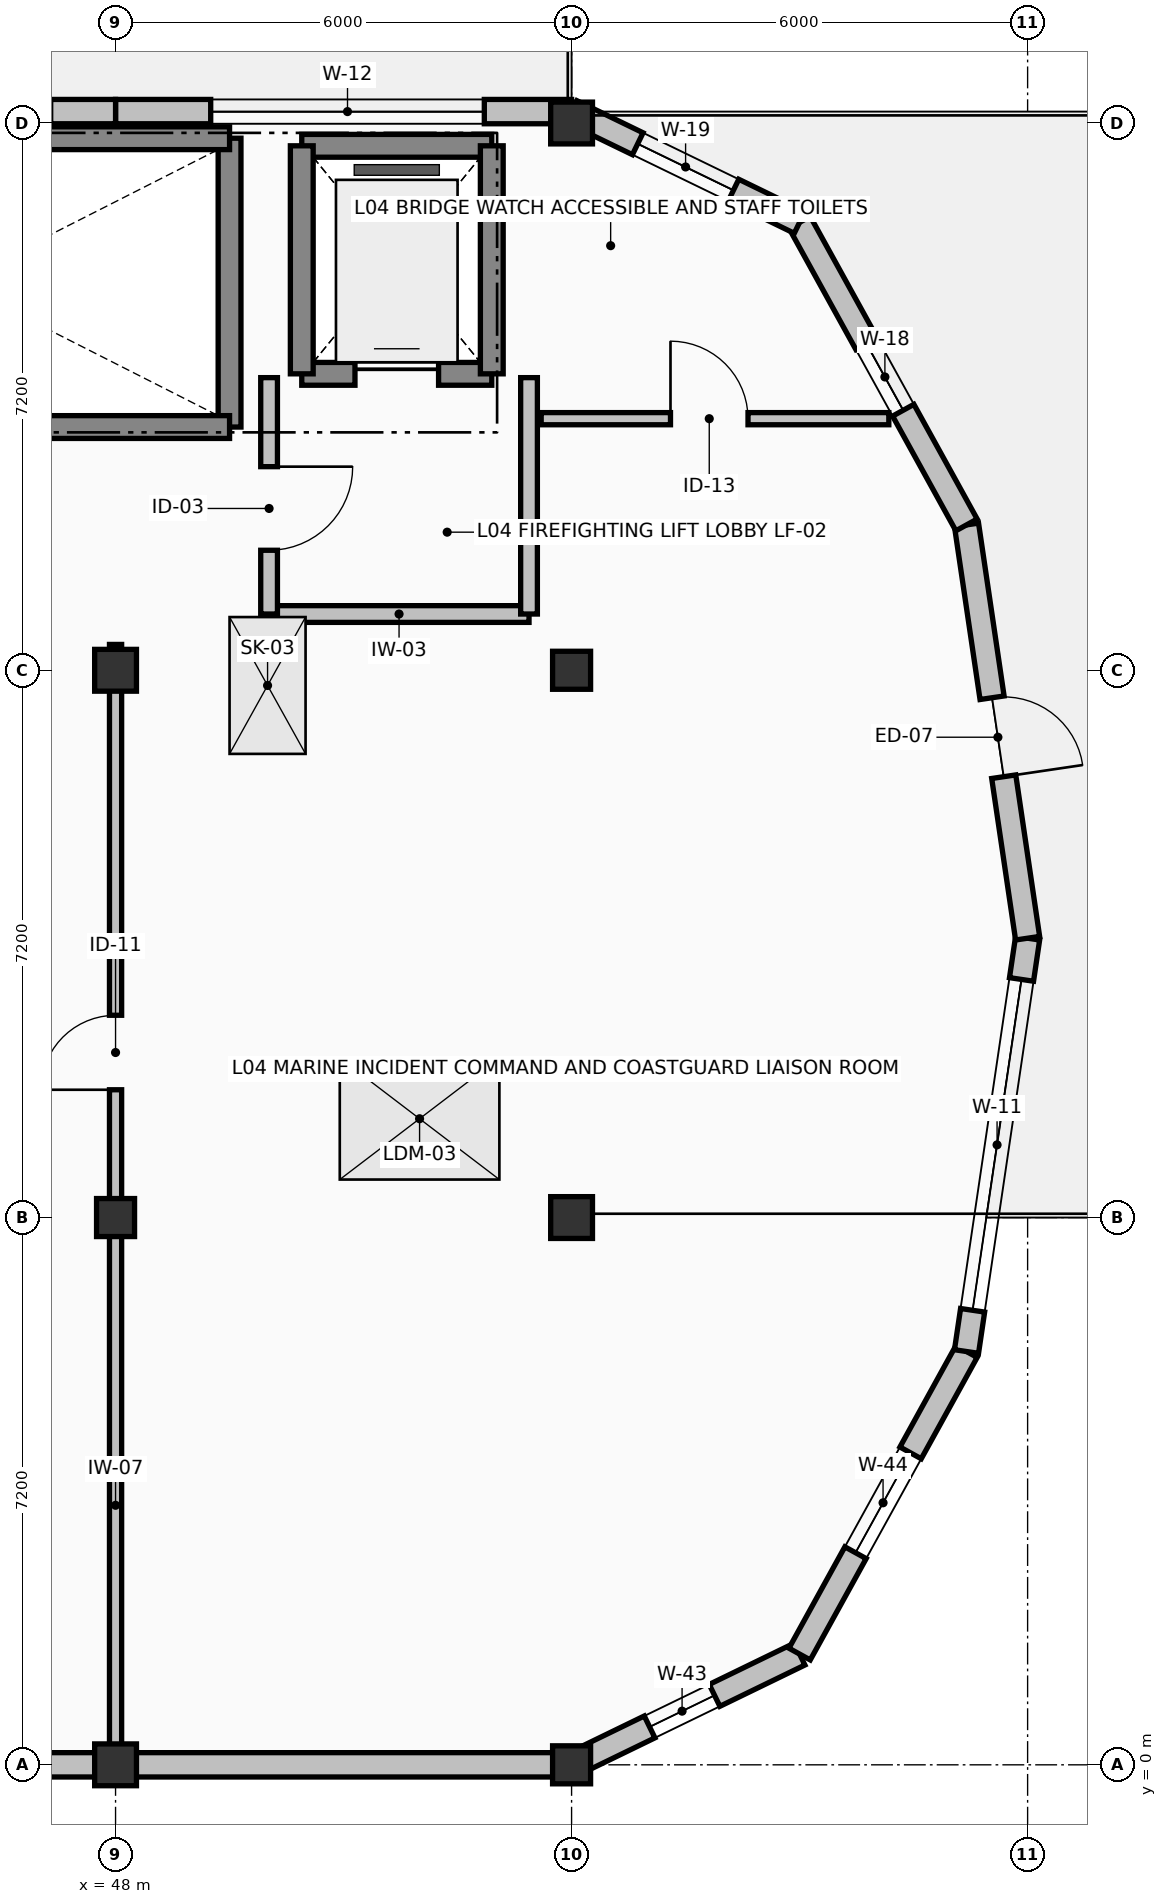
"""IFC4 building model, lengths in metres.
Left out: names, types, materials, properties, quantities, classifications, styles, units other than length and angle.
Written with IfcOpenShell. Run it as: python <this file> out.ifc"""

import sys

from ifc_helpers import new_model, si_unit, direction, frame, frame_2d, origin, origin_2d, place, context, subcontext, project, spatial, rectangle, extrude, element, fill, save


model = new_model("IFC4")
c1 = context("Model", 3, precision=1e-05, world=origin(), true_north=direction((0.0, 1.0)))
c2 = subcontext(c1, "Body", "Model", "MODEL_VIEW")
j1 = project(units=[si_unit("LENGTHUNIT", "METRE"), si_unit("PLANEANGLEUNIT", "RADIAN")], contexts=[c1])
p1 = place(None, origin())
s1 = spatial("IfcSite", under=j1, at=p1, CompositionType="ELEMENT")
p2 = place(p1, origin())
s2 = spatial("IfcBuilding", under=s1, at=p2, CompositionType="ELEMENT")
p3 = place(p2, frame((0.0, 0.0, 17.32)))
s3 = spatial("IfcBuildingStorey", under=s2, at=p3, CompositionType="ELEMENT", Elevation=17.32)
p4 = place(p3, frame((48.0, 0.0, 0.0), z_axis=(0.0, 0.0, 1.0), x_axis=(1.0, 0.0, 0.0)))
e1 = element("IfcColumn", 1, at=p4, inside=s3, PredefinedType="COLUMN", context=c2, shape_type="SweptSolid", body=[
    extrude(rectangle(XDim=0.55, YDim=0.55, at=origin_2d()), origin(), (0.0, 0.0, 1.0), 3.74),
])
p5 = place(p3, frame((48.0, 7.2, 0.0), z_axis=(0.0, 0.0, 1.0), x_axis=(1.0, 0.0, 0.0)))
e2 = element("IfcColumn", 2, at=p5, inside=s3, PredefinedType="COLUMN", context=c2, shape_type="SweptSolid", body=[
    extrude(rectangle(XDim=0.5, YDim=0.5, at=origin_2d()), origin(), (0.0, 0.0, 1.0), 3.74),
])
p6 = place(p3, frame((48.0, 14.4, 0.0), z_axis=(0.0, 0.0, 1.0), x_axis=(1.0, 0.0, 0.0)))
e3 = element("IfcColumn", 3, at=p6, inside=s3, PredefinedType="COLUMN", context=c2, shape_type="SweptSolid", body=[
    extrude(rectangle(XDim=0.55, YDim=0.55, at=origin_2d()), origin(), (0.0, 0.0, 1.0), 3.74),
])
p7 = place(p3, frame((54.0, 0.0, 0.0), z_axis=(0.0, 0.0, 1.0), x_axis=(1.0, 0.0, 0.0)))
e4 = element("IfcColumn", 4, at=p7, inside=s3, PredefinedType="COLUMN", context=c2, shape_type="SweptSolid", body=[
    extrude(rectangle(XDim=0.5, YDim=0.5, at=origin_2d()), origin(), (0.0, 0.0, 1.0), 3.74),
])
p8 = place(p3, frame((54.0, 7.2, 0.0), z_axis=(0.0, 0.0, 1.0), x_axis=(1.0, 0.0, 0.0)))
e5 = element("IfcColumn", 5, at=p8, inside=s3, PredefinedType="COLUMN", context=c2, shape_type="SweptSolid", body=[
    extrude(rectangle(XDim=0.55, YDim=0.55, at=origin_2d()), origin(), (0.0, 0.0, 1.0), 3.74),
])
p9 = place(p3, frame((54.0, 14.4, 0.0), z_axis=(0.0, 0.0, 1.0), x_axis=(1.0, 0.0, 0.0)))
e6 = element("IfcColumn", 6, at=p9, inside=s3, PredefinedType="COLUMN", context=c2, shape_type="SweptSolid", body=[
    extrude(rectangle(XDim=0.5, YDim=0.5, at=origin_2d()), origin(), (0.0, 0.0, 1.0), 3.74),
])
p10 = place(p3, frame((54.0, 21.6, 0.0), z_axis=(0.0, 0.0, 1.0), x_axis=(1.0, 0.0, 0.0)))
e7 = element("IfcColumn", 7, at=p10, inside=s3, PredefinedType="COLUMN", context=c2, shape_type="SweptSolid", body=[
    extrude(rectangle(XDim=0.55, YDim=0.55, at=origin_2d()), origin(), (0.0, 0.0, 1.0), 3.74),
])
p11 = place(p3, frame((49.5, 17.6, 0.0), z_axis=(0.0, 0.0, 1.0), x_axis=(0.0, 1.0, 0.0)))
e8 = element("IfcWall", 8, at=p11, inside=s3, PredefinedType="SHEAR", context=c2, shape_type="SweptSolid", body=[
    extrude(rectangle(XDim=3.8, YDim=0.3, at=frame_2d((1.9, 0.0))), origin(), (0.0, 0.0, 1.0), 3.44),
])
p12 = place(p3, frame((42.0, 0.0, 0.0), z_axis=(0.0, 0.0, 1.0), x_axis=(1.0, 0.0, 0.0)))
e9 = element("IfcWall", 9, at=p12, inside=s3, PredefinedType="SOLIDWALL", context=c2, shape_type="SweptSolid", body=[
    extrude(rectangle(XDim=6.0, YDim=0.32, at=frame_2d((3.0, 0.0))), origin(), (0.0, 0.0, 1.0), 2.75),
])
p13 = place(p3, frame((48.0, 0.0, 0.0), z_axis=(0.0, 0.0, 1.0), x_axis=(1.0, 0.0, 0.0)))
e10 = element("IfcWall", 10, at=p13, inside=s3, PredefinedType="SOLIDWALL", context=c2, shape_type="SweptSolid", body=[
    extrude(rectangle(XDim=6.0, YDim=0.32, at=frame_2d((3.0, 0.0))), origin(), (0.0, 0.0, 1.0), 2.8),
])
p14 = place(p3, frame((54.0, 0.0, 0.0), z_axis=(0.0, 0.0, 1.0), x_axis=(0.899521309608, 0.436876886046, 0.0)))
e11 = element("IfcWall", 11, at=p14, inside=s3, PredefinedType="SOLIDWALL", context=c2, shape_type="SweptSolid", body=[
    extrude(rectangle(XDim=3.335, YDim=0.32, at=frame_2d((1.667, 0.0))), origin(), (0.0, 0.0, 1.0), 3.42),
])
p15 = place(p14, frame((1.141, 0.0, 1.15)))
e12 = element("IfcOpeningElement", 12, at=p15, cuts=e11, PredefinedType="OPENING", context=c2, shape_type="SweptSolid", body=[
    extrude(rectangle(XDim=0.95, YDim=0.95, at=frame_2d((0.475, 0.475))), frame((0.0, 0.17, 0.0), z_axis=(0.0, -1.0, 0.0), x_axis=(1.0, 0.0, 0.0)), (0.0, 0.0, 1.0), 0.34),
])
p16 = place(p3, frame((57.0, 1.457, 0.0), z_axis=(0.0, 0.0, 1.0), x_axis=(0.483105735842, 0.875562018361, 0.0)))
e13 = element("IfcWall", 13, at=p16, inside=s3, PredefinedType="SOLIDWALL", context=c2, shape_type="SweptSolid", body=[
    extrude(rectangle(XDim=4.546, YDim=0.32, at=frame_2d((2.273, 0.0))), origin(), (0.0, 0.0, 1.0), 3.42),
])
p17 = place(p16, frame((1.523, 0.0, 1.15)))
e14 = element("IfcOpeningElement", 14, at=p17, cuts=e13, PredefinedType="OPENING", context=c2, shape_type="SweptSolid", body=[
    extrude(rectangle(XDim=1.5, YDim=1.5, at=frame_2d((0.75, 0.75))), frame((0.0, 0.17, 0.0), z_axis=(0.0, -1.0, 0.0), x_axis=(1.0, 0.0, 0.0)), (0.0, 0.0, 1.0), 0.34),
])
p18 = place(p3, frame((59.196, 5.438, 0.0), z_axis=(0.0, 0.0, 1.0), x_axis=(0.146220266432, 0.98925205771, 0.0)))
e15 = element("IfcWall", 15, at=p18, inside=s3, PredefinedType="SOLIDWALL", context=c2, shape_type="SweptSolid", body=[
    extrude(rectangle(XDim=5.497, YDim=0.32, at=frame_2d((2.748, 0.0))), origin(), (0.0, 0.0, 1.0), 3.42),
])
p19 = place(p18, frame((0.548, 0.0, 0.9)))
e16 = element("IfcOpeningElement", 16, at=p19, cuts=e15, PredefinedType="OPENING", context=c2, shape_type="SweptSolid", body=[
    extrude(rectangle(XDim=4.4, YDim=1.85, at=frame_2d((2.2, 0.925))), frame((0.0, 0.17, 0.0), z_axis=(0.0, -1.0, 0.0), x_axis=(1.0, 0.0, 0.0)), (0.0, 0.0, 1.0), 0.34),
])
p20 = place(p3, frame((60.0, 10.875, 0.0), z_axis=(0.0, 0.0, 1.0), x_axis=(-0.146220266432, 0.98925205771, 0.0)))
e17 = element("IfcWall", 17, at=p20, inside=s3, PredefinedType="SOLIDWALL", context=c2, shape_type="SweptSolid", body=[
    extrude(rectangle(XDim=5.497, YDim=0.32, at=frame_2d((2.748, 0.0))), origin(), (0.0, 0.0, 1.0), 3.42),
])
p21 = place(p20, frame((2.148, 0.0, 0.0)))
e18 = element("IfcOpeningElement", 18, at=p21, cuts=e17, PredefinedType="OPENING", context=c2, shape_type="SweptSolid", body=[
    extrude(rectangle(XDim=1.05, YDim=2.15, at=frame_2d((0.525, 1.075))), frame((0.0, 0.17, 0.0), z_axis=(0.0, -1.0, 0.0), x_axis=(1.0, 0.0, 0.0)), (0.0, 0.0, 1.0), 0.34),
])
p22 = place(p3, frame((59.196, 16.312, 0.0), z_axis=(0.0, 0.0, 1.0), x_axis=(-0.483105735842, 0.875562018361, 0.0)))
e19 = element("IfcWall", 19, at=p22, inside=s3, PredefinedType="SOLIDWALL", context=c2, shape_type="SweptSolid", body=[
    extrude(rectangle(XDim=4.546, YDim=0.32, at=frame_2d((2.273, 0.0))), origin(), (0.0, 0.0, 1.0), 3.42),
])
p23 = place(p22, frame((1.723, 0.0, 1.15)))
e20 = element("IfcOpeningElement", 20, at=p23, cuts=e19, PredefinedType="OPENING", context=c2, shape_type="SweptSolid", body=[
    extrude(rectangle(XDim=1.0, YDim=1.0, at=frame_2d((0.5, 0.5))), frame((0.0, 0.17, 0.0), z_axis=(0.0, -1.0, 0.0), x_axis=(1.0, 0.0, 0.0)), (0.0, 0.0, 1.0), 0.34),
])
p24 = place(p3, frame((57.0, 20.293, 0.0), z_axis=(0.0, 0.0, 1.0), x_axis=(-0.899521309608, 0.436876886046, 0.0)))
e21 = element("IfcWall", 21, at=p24, inside=s3, PredefinedType="SOLIDWALL", context=c2, shape_type="SweptSolid", body=[
    extrude(rectangle(XDim=3.335, YDim=0.32, at=frame_2d((1.667, 0.0))), origin(), (0.0, 0.0, 1.0), 3.42),
])
p25 = place(p24, frame((0.968, 0.0, 1.15)))
e22 = element("IfcOpeningElement", 22, at=p25, cuts=e21, PredefinedType="OPENING", context=c2, shape_type="SweptSolid", body=[
    extrude(rectangle(XDim=1.4, YDim=1.4, at=frame_2d((0.7, 0.7))), frame((0.0, 0.17, 0.0), z_axis=(0.0, -1.0, 0.0), x_axis=(1.0, 0.0, 0.0)), (0.0, 0.0, 1.0), 0.34),
])
p26 = place(p3, frame((54.0, 21.75, 0.0), z_axis=(0.0, 0.0, 1.0), x_axis=(-1.0, 0.0, 0.0)))
e23 = element("IfcWall", 23, at=p26, inside=s3, PredefinedType="SOLIDWALL", context=c2, shape_type="SweptSolid", body=[
    extrude(rectangle(XDim=6.0, YDim=0.32, at=frame_2d((3.0, 0.0))), origin(), (0.0, 0.0, 1.0), 3.42),
])
p27 = place(p26, frame((1.148, 0.0, 0.9)))
e24 = element("IfcOpeningElement", 24, at=p27, cuts=e23, PredefinedType="OPENING", context=c2, shape_type="SweptSolid", body=[
    extrude(rectangle(XDim=3.6, YDim=1.85, at=frame_2d((1.8, 0.925))), frame((0.0, 0.17, 0.0), z_axis=(0.0, -1.0, 0.0), x_axis=(1.0, 0.0, 0.0)), (0.0, 0.0, 1.0), 0.34),
])
p28 = place(p3, frame((48.0, 21.75, 0.0), z_axis=(0.0, 0.0, 1.0), x_axis=(-1.0, 0.0, 0.0)))
e25 = element("IfcWall", 25, at=p28, inside=s3, PredefinedType="SOLIDWALL", context=c2, shape_type="SweptSolid", body=[
    extrude(rectangle(XDim=6.0, YDim=0.32, at=frame_2d((3.0, 0.0))), origin(), (0.0, 0.0, 1.0), 3.42),
])
p29 = place(p28, frame((0.853, 0.0, 0.9)))
e26 = element("IfcOpeningElement", 26, at=p29, cuts=e25, PredefinedType="OPENING", context=c2, shape_type="SweptSolid", body=[
    extrude(rectangle(XDim=4.4, YDim=1.85, at=frame_2d((2.2, 0.925))), frame((0.0, 0.17, 0.0), z_axis=(0.0, -1.0, 0.0), x_axis=(1.0, 0.0, 0.0)), (0.0, 0.0, 1.0), 0.34),
])
p30 = place(p3, frame((40.5, 21.4, 0.0), z_axis=(0.0, 0.0, 1.0), x_axis=(1.0, 0.0, 0.0)))
e27 = element("IfcWall", 27, at=p30, inside=s3, PredefinedType="SHEAR", context=c2, shape_type="SweptSolid", body=[
    extrude(rectangle(XDim=9.0, YDim=0.3, at=frame_2d((4.5, 0.0))), origin(), (0.0, 0.0, 1.0), 3.44),
])
p31 = place(p3, frame((40.5, 17.6, 0.0), z_axis=(0.0, 0.0, 1.0), x_axis=(1.0, 0.0, 0.0)))
e28 = element("IfcWall", 28, at=p31, inside=s3, PredefinedType="SHEAR", context=c2, shape_type="SweptSolid", body=[
    extrude(rectangle(XDim=9.0, YDim=0.3, at=frame_2d((4.5, 0.0))), origin(), (0.0, 0.0, 1.0), 3.44),
])
p32 = place(p31, frame((0.35, 0.0, 0.0)))
e29 = element("IfcOpeningElement", 29, at=p32, cuts=e28, PredefinedType="OPENING", context=c2, shape_type="SweptSolid", body=[
    extrude(rectangle(XDim=1.15, YDim=2.15, at=frame_2d((0.575, 1.075))), frame((0.0, 0.16, 0.0), z_axis=(0.0, -1.0, 0.0), x_axis=(1.0, 0.0, 0.0)), (0.0, 0.0, 1.0), 0.32),
])
p33 = place(p3, frame((50.45, 18.3, 0.0), z_axis=(0.0, 0.0, 1.0), x_axis=(1.0, 0.0, 0.0)))
e30 = element("IfcWall", 30, at=p33, inside=s3, PredefinedType="SHEAR", context=c2, shape_type="SweptSolid", body=[
    extrude(rectangle(XDim=2.5, YDim=0.3, at=frame_2d((1.25, 0.0))), origin(), (0.0, 0.0, 1.0), 3.74),
])
p34 = place(p33, frame((0.7, 0.0, 0.0)))
e31 = element("IfcOpeningElement", 31, at=p34, cuts=e30, PredefinedType="OPENING", context=c2, shape_type="SweptSolid", body=[
    extrude(rectangle(XDim=1.1, YDim=2.1, at=frame_2d((0.55, 1.05))), frame((0.0, 0.16, 0.0), z_axis=(0.0, -1.0, 0.0), x_axis=(1.0, 0.0, 0.0)), (0.0, 0.0, 1.0), 0.32),
])
p35 = place(p3, frame((50.45, 21.3, 0.0), z_axis=(0.0, 0.0, 1.0), x_axis=(1.0, 0.0, 0.0)))
e32 = element("IfcWall", 32, at=p35, inside=s3, PredefinedType="SHEAR", context=c2, shape_type="SweptSolid", body=[
    extrude(rectangle(XDim=2.5, YDim=0.3, at=frame_2d((1.25, 0.0))), origin(), (0.0, 0.0, 1.0), 3.74),
])
for number, where, z_axis, x_axis in (
    (33, (50.45, 18.3, 0.0), (0.0, 0.0, 1.0), (0.0, 1.0, 0.0)),
    (34, (52.95, 18.3, 0.0), (0.0, 0.0, 1.0), (0.0, 1.0, 0.0)),
):
    element("IfcWall", number, at=place(p3, frame(where, z_axis=z_axis, x_axis=x_axis)), inside=s3, PredefinedType="SHEAR", context=c2, shape_type="SweptSolid", body=[
        extrude(rectangle(XDim=3.0, YDim=0.3, at=frame_2d((1.5, 0.0))), origin(), (0.0, 0.0, 1.0), 3.74),
    ])
p36 = place(p3, frame((50.02, 15.14, 0.0), z_axis=(0.0, 0.0, 1.0), x_axis=(1.0, 0.0, 0.0)))
e35 = element("IfcWall", 35, at=p36, inside=s3, PredefinedType="SOLIDWALL", context=c2, shape_type="SweptSolid", body=[
    extrude(rectangle(XDim=3.42, YDim=0.22, at=frame_2d((1.71, 0.0))), origin(), (0.0, 0.0, 1.0), 3.46),
])
p37 = place(p3, frame((53.44, 15.14, 0.0), z_axis=(0.0, 0.0, 1.0), x_axis=(0.0, 1.0, 0.0)))
e36 = element("IfcWall", 36, at=p37, inside=s3, PredefinedType="SOLIDWALL", context=c2, shape_type="SweptSolid", body=[
    extrude(rectangle(XDim=3.11, YDim=0.22, at=frame_2d((1.555, 0.0))), origin(), (0.0, 0.0, 1.0), 3.46),
])
p38 = place(p3, frame((50.02, 18.25, 0.0), z_axis=(0.0, 0.0, 1.0), x_axis=(0.0, -1.0, 0.0)))
e37 = element("IfcWall", 37, at=p38, inside=s3, PredefinedType="SOLIDWALL", context=c2, shape_type="SweptSolid", body=[
    extrude(rectangle(XDim=3.11, YDim=0.22, at=frame_2d((1.555, 0.0))), origin(), (0.0, 0.0, 1.0), 3.46),
])
p39 = place(p38, frame((1.171, 0.0, 0.0)))
e38 = element("IfcOpeningElement", 38, at=p39, cuts=e37, PredefinedType="OPENING", context=c2, shape_type="SweptSolid", body=[
    extrude(rectangle(XDim=1.1, YDim=2.15, at=frame_2d((0.55, 1.075))), frame((0.0, 0.12, 0.0), z_axis=(0.0, -1.0, 0.0), x_axis=(1.0, 0.0, 0.0)), (0.0, 0.0, 1.0), 0.24),
])
p40 = place(p3, frame((48.0, 0.22, 0.0), z_axis=(0.0, 0.0, 1.0), x_axis=(0.0, 1.0, 0.0)))
e39 = element("IfcWall", 39, at=p40, inside=s3, PredefinedType="PARTITIONING", context=c2, shape_type="SweptSolid", body=[
    extrude(rectangle(XDim=14.52, YDim=0.16, at=frame_2d((7.26, 0.0))), origin(), (0.0, 0.0, 1.0), 2.5),
])
p41 = place(p40, frame((8.661, 0.0, 0.0)))
e40 = element("IfcOpeningElement", 40, at=p41, cuts=e39, PredefinedType="OPENING", context=c2, shape_type="SweptSolid", body=[
    extrude(rectangle(XDim=0.98, YDim=2.12, at=frame_2d((0.49, 1.06))), frame((0.0, 0.09, 0.0), z_axis=(0.0, -1.0, 0.0), x_axis=(1.0, 0.0, 0.0)), (0.0, 0.0, 1.0), 0.18),
])
p42 = place(p3, frame((53.6, 17.71, 0.0), z_axis=(0.0, 0.0, 1.0), x_axis=(1.0, 0.0, 0.0)))
e41 = element("IfcWall", 41, at=p42, inside=s3, PredefinedType="PARTITIONING", context=c2, shape_type="SweptSolid", body=[
    extrude(rectangle(XDim=4.574, YDim=0.16, at=frame_2d((2.287, 0.0))), origin(), (0.0, 0.0, 1.0), 3.13),
])
p43 = place(p42, frame((1.701, 0.0, 0.0)))
e42 = element("IfcOpeningElement", 42, at=p43, cuts=e41, PredefinedType="OPENING", context=c2, shape_type="SweptSolid", body=[
    extrude(rectangle(XDim=1.02, YDim=2.1, at=frame_2d((0.51, 1.05))), frame((0.0, 0.09, 0.0), z_axis=(0.0, -1.0, 0.0), x_axis=(1.0, 0.0, 0.0)), (0.0, 0.0, 1.0), 0.18),
])
p44 = place(p15, origin())
e43 = element("IfcWindow", 43, at=p44, inside=s3, PartitioningType="SINGLE_PANEL", PredefinedType="WINDOW", context=c2, shape_type="SweptSolid", body=[
    extrude(rectangle(XDim=0.95, YDim=0.95, at=frame_2d((0.475, 0.475))), frame((0.0, 0.03, 0.0), z_axis=(0.0, -1.0, 0.0), x_axis=(1.0, 0.0, 0.0)), (0.0, 0.0, 1.0), 0.06),
])
fill(e12, e43)
p45 = place(p17, origin())
e44 = element("IfcWindow", 44, at=p45, inside=s3, PartitioningType="SINGLE_PANEL", PredefinedType="WINDOW", context=c2, shape_type="SweptSolid", body=[
    extrude(rectangle(XDim=1.5, YDim=1.5, at=frame_2d((0.75, 0.75))), frame((0.0, 0.03, 0.0), z_axis=(0.0, -1.0, 0.0), x_axis=(1.0, 0.0, 0.0)), (0.0, 0.0, 1.0), 0.06),
])
fill(e14, e44)
p46 = place(p19, origin())
e45 = element("IfcWindow", 45, at=p46, inside=s3, PartitioningType="SINGLE_PANEL", PredefinedType="WINDOW", context=c2, shape_type="SweptSolid", body=[
    extrude(rectangle(XDim=4.4, YDim=1.85, at=frame_2d((2.2, 0.925))), frame((0.0, 0.03, 0.0), z_axis=(0.0, -1.0, 0.0), x_axis=(1.0, 0.0, 0.0)), (0.0, 0.0, 1.0), 0.06),
])
fill(e16, e45)
p47 = place(p21, frame((1.05, 0.0, 0.0), z_axis=(0.0, 0.0, 1.0), x_axis=(-1.0, 0.0, 0.0)))
e46 = element("IfcDoor", 46, at=p47, inside=s3, OperationType="SINGLE_SWING_RIGHT", PredefinedType="DOOR", context=c2, shape_type="SweptSolid", body=[
    extrude(rectangle(XDim=1.05, YDim=2.15, at=frame_2d((0.525, 1.075))), frame((0.0, 0.025, 0.0), z_axis=(0.0, -1.0, 0.0), x_axis=(1.0, 0.0, 0.0)), (0.0, 0.0, 1.0), 0.05),
])
fill(e18, e46)
p48 = place(p23, origin())
e47 = element("IfcWindow", 47, at=p48, inside=s3, PartitioningType="SINGLE_PANEL", PredefinedType="WINDOW", context=c2, shape_type="SweptSolid", body=[
    extrude(rectangle(XDim=1.0, YDim=1.0, at=frame_2d((0.5, 0.5))), frame((0.0, 0.03, 0.0), z_axis=(0.0, -1.0, 0.0), x_axis=(1.0, 0.0, 0.0)), (0.0, 0.0, 1.0), 0.06),
])
fill(e20, e47)
p49 = place(p25, origin())
e48 = element("IfcWindow", 48, at=p49, inside=s3, PartitioningType="SINGLE_PANEL", PredefinedType="WINDOW", context=c2, shape_type="SweptSolid", body=[
    extrude(rectangle(XDim=1.4, YDim=1.4, at=frame_2d((0.7, 0.7))), frame((0.0, 0.03, 0.0), z_axis=(0.0, -1.0, 0.0), x_axis=(1.0, 0.0, 0.0)), (0.0, 0.0, 1.0), 0.06),
])
fill(e22, e48)
p50 = place(p27, origin())
e49 = element("IfcWindow", 49, at=p50, inside=s3, PartitioningType="SINGLE_PANEL", PredefinedType="WINDOW", context=c2, shape_type="SweptSolid", body=[
    extrude(rectangle(XDim=3.6, YDim=1.85, at=frame_2d((1.8, 0.925))), frame((0.0, 0.03, 0.0), z_axis=(0.0, -1.0, 0.0), x_axis=(1.0, 0.0, 0.0)), (0.0, 0.0, 1.0), 0.06),
])
fill(e24, e49)
p51 = place(p2, frame((0.0, 0.0, 21.06)))
p52 = place(p51, frame((0.0, 0.0, -0.28)))
p53 = place(p52, frame((50.0, 14.2, 0.0)))
p54 = place(p53, frame((0.0, 0.0, 0.23)))
e50 = element("IfcWindow", 50, at=p54, inside=s3, PartitioningType="SINGLE_PANEL", PredefinedType="SKYLIGHT", context=c2, shape_type="SweptSolid", body=[
    extrude(rectangle(XDim=1.0, YDim=1.8, at=origin_2d()), origin(), (0.0, 0.0, 1.0), 0.05),
])
p55 = place(p52, frame((52.0, 8.5, 0.0)))
p56 = place(p55, frame((0.0, 0.0, 0.23)))
e51 = element("IfcWindow", 51, at=p56, inside=s3, PartitioningType="SINGLE_PANEL", PredefinedType="LIGHTDOME", context=c2, shape_type="SweptSolid", body=[
    extrude(rectangle(XDim=2.1, YDim=1.6, at=origin_2d()), origin(), (0.0, 0.0, 1.0), 0.05),
])
p57 = place(p34, origin())
e52 = element("IfcDoor", 52, at=p57, inside=s3, OperationType="SLIDING_TO_LEFT", PredefinedType="DOOR", context=c2, shape_type="SweptSolid", body=[
    extrude(rectangle(XDim=1.1, YDim=2.1, at=frame_2d((0.55, 1.05))), frame((0.0, 0.025, 0.0), z_axis=(0.0, -1.0, 0.0), x_axis=(1.0, 0.0, 0.0)), (0.0, 0.0, 1.0), 0.05),
])
fill(e31, e52)
p58 = place(p39, origin())
e53 = element("IfcDoor", 53, at=p58, inside=s3, OperationType="SINGLE_SWING_LEFT", PredefinedType="DOOR", context=c2, shape_type="SweptSolid", body=[
    extrude(rectangle(XDim=1.1, YDim=2.15, at=frame_2d((0.55, 1.075))), frame((0.0, 0.025, 0.0), z_axis=(0.0, -1.0, 0.0), x_axis=(1.0, 0.0, 0.0)), (0.0, 0.0, 1.0), 0.05),
])
fill(e38, e53)
p59 = place(p41, origin())
e54 = element("IfcDoor", 54, at=p59, inside=s3, OperationType="SINGLE_SWING_LEFT", PredefinedType="DOOR", context=c2, shape_type="SweptSolid", body=[
    extrude(rectangle(XDim=0.98, YDim=2.12, at=frame_2d((0.49, 1.06))), frame((0.0, 0.025, 0.0), z_axis=(0.0, -1.0, 0.0), x_axis=(1.0, 0.0, 0.0)), (0.0, 0.0, 1.0), 0.05),
])
fill(e40, e54)
p60 = place(p43, origin())
e55 = element("IfcDoor", 55, at=p60, inside=s3, OperationType="SINGLE_SWING_LEFT", PredefinedType="DOOR", context=c2, shape_type="SweptSolid", body=[
    extrude(rectangle(XDim=1.02, YDim=2.1, at=frame_2d((0.51, 1.05))), frame((0.0, 0.025, 0.0), z_axis=(0.0, -1.0, 0.0), x_axis=(1.0, 0.0, 0.0)), (0.0, 0.0, 1.0), 0.05),
])
fill(e42, e55)
save(model, sys.argv[1])
